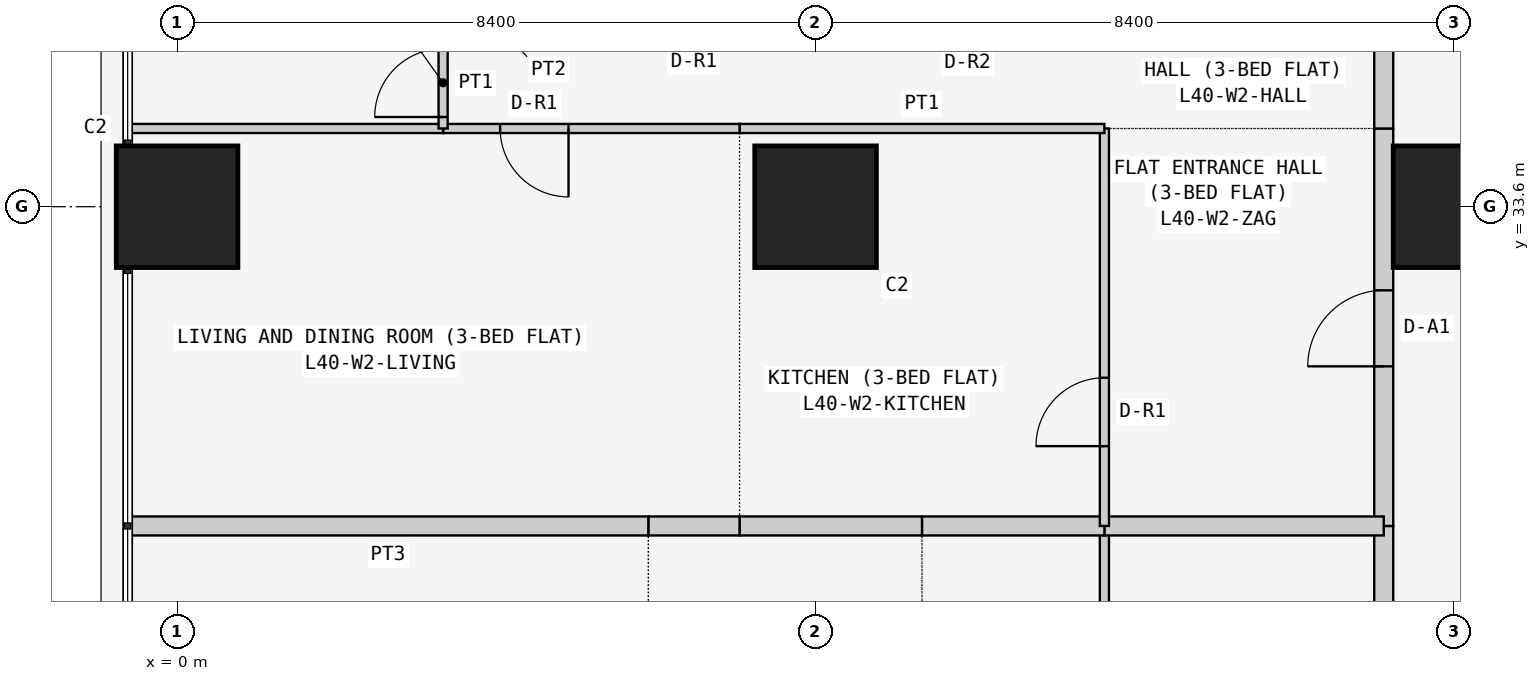
"""IFC4 building model, lengths in metres.
Left out: names, types, materials, properties, quantities, classifications, styles, units other than length and angle.
Written with IfcOpenShell. Run it as: python <this file> out.ifc"""

import sys

from ifc_helpers import new_model, si_unit, direction, frame, frame_2d, origin, origin_2d, place, context, subcontext, project, spatial, rectangle, extrude, element, fill, save


model = new_model("IFC4")
c1 = context("Model", 3, precision=1e-05, world=origin(), true_north=direction((0.0, 1.0)))
c2 = subcontext(c1, "Body", "Model", "MODEL_VIEW")
j1 = project(units=[si_unit("LENGTHUNIT", "METRE"), si_unit("PLANEANGLEUNIT", "RADIAN")], contexts=[c1])
p1 = place(None, origin())
s1 = spatial("IfcSite", under=j1, at=p1, CompositionType="ELEMENT")
p2 = place(p1, origin())
s2 = spatial("IfcBuilding", under=s1, at=p2, CompositionType="ELEMENT")
p3 = place(p2, frame((0.0, 0.0, 155.7)))
s3 = spatial("IfcBuildingStorey", under=s2, at=p3, CompositionType="ELEMENT", Elevation=155.7)
for number, where, z_axis, x_axis in (
    (1, (0.0, 33.6, 0.0), (0.0, 0.0, 1.0), (1.0, 0.0, 0.0)),
    (2, (8.4, 33.6, 0.0), (0.0, 0.0, 1.0), (1.0, 0.0, 0.0)),
    (3, (16.8, 33.6, 0.0), (0.0, 0.0, 1.0), (1.0, 0.0, 0.0)),
):
    element("IfcColumn", number, at=place(p3, frame(where, z_axis=z_axis, x_axis=x_axis)), inside=s3, PredefinedType="COLUMN", context=c2, shape_type="SweptSolid", body=[
        extrude(rectangle(XDim=1.6, YDim=1.6, at=origin_2d()), origin(), (0.0, 0.0, 1.0), 3.6),
    ])
p4 = place(p3, frame((15.875, 24.171, 0.0), z_axis=(0.0, 0.0, 1.0), x_axis=(0.0, 1.0, 0.0)))
e4 = element("IfcWall", 4, at=p4, inside=s3, PredefinedType="PARTITIONING", context=c2, shape_type="SweptSolid", body=[
    extrude(rectangle(XDim=5.229, YDim=0.25, at=frame_2d((2.615, 0.0))), origin(), (0.0, 0.0, 1.0), 3.45),
])
p5 = place(p4, frame((2.129, 0.0, 0.0)))
e5 = element("IfcOpeningElement", 5, at=p5, cuts=e4, PredefinedType="OPENING", context=c2, shape_type="SweptSolid", body=[
    extrude(rectangle(XDim=1.0, YDim=2.1, at=frame_2d((0.5, 1.05))), frame((0.0, 0.135, 0.0), z_axis=(0.0, -1.0, 0.0), x_axis=(1.0, 0.0, 0.0)), (0.0, 0.0, 1.0), 0.27),
])
p6 = place(p3, frame((15.875, 29.4, 0.0), z_axis=(0.0, 0.0, 1.0), x_axis=(0.0, 1.0, 0.0)))
e6 = element("IfcWall", 6, at=p6, inside=s3, PredefinedType="PARTITIONING", context=c2, shape_type="SweptSolid", body=[
    extrude(rectangle(XDim=5.229, YDim=0.25, at=frame_2d((2.615, 0.0))), origin(), (0.0, 0.0, 1.0), 3.45),
])
p7 = place(p6, frame((2.1, 0.0, 0.0)))
e7 = element("IfcOpeningElement", 7, at=p7, cuts=e6, PredefinedType="OPENING", context=c2, shape_type="SweptSolid", body=[
    extrude(rectangle(XDim=1.0, YDim=2.1, at=frame_2d((0.5, 1.05))), frame((0.0, 0.135, 0.0), z_axis=(0.0, -1.0, 0.0), x_axis=(1.0, 0.0, 0.0)), (0.0, 0.0, 1.0), 0.27),
])
p8 = place(p3, frame((15.875, 34.629, 0.0), z_axis=(0.0, 0.0, 1.0), x_axis=(0.0, 1.0, 0.0)))
e8 = element("IfcWall", 8, at=p8, inside=s3, PredefinedType="PARTITIONING", context=c2, shape_type="SweptSolid", body=[
    extrude(rectangle(XDim=1.2, YDim=0.25, at=frame_2d((0.6, 0.0))), origin(), (0.0, 0.0, 1.0), 3.45),
])
p9 = place(p3, frame((12.2, 29.4, 0.0), z_axis=(0.0, 0.0, 1.0), x_axis=(0.0, -1.0, 0.0)))
e9 = element("IfcWall", 9, at=p9, inside=s3, PredefinedType="PARTITIONING", context=c2, shape_type="SweptSolid", body=[
    extrude(rectangle(XDim=5.229, YDim=0.12, at=frame_2d((2.615, 0.0))), origin(), (0.0, 0.0, 1.0), 3.45),
])
p10 = place(p3, frame((15.875, 29.4, 0.0), z_axis=(0.0, 0.0, 1.0), x_axis=(-1.0, 0.0, 0.0)))
e10 = element("IfcWall", 10, at=p10, inside=s3, PredefinedType="PARTITIONING", context=c2, shape_type="SweptSolid", body=[
    extrude(rectangle(XDim=3.675, YDim=0.25, at=frame_2d((1.837, 0.0))), origin(), (0.0, 0.0, 1.0), 3.45),
])
p11 = place(p3, frame((12.2, 29.4, 0.0), z_axis=(0.0, 0.0, 1.0), x_axis=(-1.0, 0.0, 0.0)))
e11 = element("IfcWall", 11, at=p11, inside=s3, PredefinedType="PARTITIONING", context=c2, shape_type="SweptSolid", body=[
    extrude(rectangle(XDim=2.4, YDim=0.25, at=frame_2d((1.2, 0.0))), origin(), (0.0, 0.0, 1.0), 3.45),
])
p12 = place(p3, frame((9.8, 29.4, 0.0), z_axis=(0.0, 0.0, 1.0), x_axis=(-1.0, 0.0, 0.0)))
e12 = element("IfcWall", 12, at=p12, inside=s3, PredefinedType="PARTITIONING", context=c2, shape_type="SweptSolid", body=[
    extrude(rectangle(XDim=2.4, YDim=0.25, at=frame_2d((1.2, 0.0))), origin(), (0.0, 0.0, 1.0), 3.45),
])
p13 = place(p3, frame((7.4, 29.4, 0.0), z_axis=(0.0, 0.0, 1.0), x_axis=(-1.0, 0.0, 0.0)))
e13 = element("IfcWall", 13, at=p13, inside=s3, PredefinedType="PARTITIONING", context=c2, shape_type="SweptSolid", body=[
    extrude(rectangle(XDim=1.2, YDim=0.25, at=frame_2d((0.6, 0.0))), origin(), (0.0, 0.0, 1.0), 3.45),
])
p14 = place(p3, frame((6.2, 29.4, 0.0), z_axis=(0.0, 0.0, 1.0), x_axis=(-1.0, 0.0, 0.0)))
e14 = element("IfcWall", 14, at=p14, inside=s3, PredefinedType="PARTITIONING", context=c2, shape_type="SweptSolid", body=[
    extrude(rectangle(XDim=6.85, YDim=0.25, at=frame_2d((3.425, 0.0))), origin(), (0.0, 0.0, 1.0), 3.45),
])
p15 = place(p3, frame((12.2, 29.4, 0.0), z_axis=(0.0, 0.0, 1.0), x_axis=(0.0, 1.0, 0.0)))
e15 = element("IfcWall", 15, at=p15, inside=s3, PredefinedType="PARTITIONING", context=c2, shape_type="SweptSolid", body=[
    extrude(rectangle(XDim=5.229, YDim=0.12, at=frame_2d((2.615, 0.0))), origin(), (0.0, 0.0, 1.0), 3.45),
])
p16 = place(p15, frame((1.05, 0.0, 0.0)))
e16 = element("IfcOpeningElement", 16, at=p16, cuts=e15, PredefinedType="OPENING", context=c2, shape_type="SweptSolid", body=[
    extrude(rectangle(XDim=0.9, YDim=2.1, at=frame_2d((0.45, 1.05))), frame((0.0, 0.07, 0.0), z_axis=(0.0, -1.0, 0.0), x_axis=(1.0, 0.0, 0.0)), (0.0, 0.0, 1.0), 0.14),
])
p17 = place(p3, frame((7.4, 34.629, 0.0), z_axis=(0.0, 0.0, 1.0), x_axis=(1.0, 0.0, 0.0)))
e17 = element("IfcWall", 17, at=p17, inside=s3, PredefinedType="PARTITIONING", context=c2, shape_type="SweptSolid", body=[
    extrude(rectangle(XDim=4.8, YDim=0.12, at=frame_2d((2.4, 0.0))), origin(), (0.0, 0.0, 1.0), 3.45),
])
p18 = place(p3, frame((3.5, 34.629, 0.0), z_axis=(0.0, 0.0, 1.0), x_axis=(1.0, 0.0, 0.0)))
e18 = element("IfcWall", 18, at=p18, inside=s3, PredefinedType="PARTITIONING", context=c2, shape_type="SweptSolid", body=[
    extrude(rectangle(XDim=3.9, YDim=0.12, at=frame_2d((1.95, 0.0))), origin(), (0.0, 0.0, 1.0), 3.45),
])
p19 = place(p18, frame((0.75, 0.0, 0.0)))
e19 = element("IfcOpeningElement", 19, at=p19, cuts=e18, PredefinedType="OPENING", context=c2, shape_type="SweptSolid", body=[
    extrude(rectangle(XDim=0.9, YDim=2.1, at=frame_2d((0.45, 1.05))), frame((0.0, 0.07, 0.0), z_axis=(0.0, -1.0, 0.0), x_axis=(1.0, 0.0, 0.0)), (0.0, 0.0, 1.0), 0.14),
])
p20 = place(p3, frame((-0.65, 34.629, 0.0), z_axis=(0.0, 0.0, 1.0), x_axis=(1.0, 0.0, 0.0)))
e20 = element("IfcWall", 20, at=p20, inside=s3, PredefinedType="PARTITIONING", context=c2, shape_type="SweptSolid", body=[
    extrude(rectangle(XDim=4.15, YDim=0.12, at=frame_2d((2.075, 0.0))), origin(), (0.0, 0.0, 1.0), 3.45),
])
p21 = place(p3, frame((3.5, 34.629, 0.0), z_axis=(0.0, 0.0, 1.0), x_axis=(0.0, 1.0, 0.0)))
e21 = element("IfcWall", 21, at=p21, inside=s3, PredefinedType="PARTITIONING", context=c2, shape_type="SweptSolid", body=[
    extrude(rectangle(XDim=1.2, YDim=0.12, at=frame_2d((0.6, 0.0))), origin(), (0.0, 0.0, 1.0), 3.45),
])
p22 = place(p21, frame((0.151, 0.0, 0.0)))
e22 = element("IfcOpeningElement", 22, at=p22, cuts=e21, PredefinedType="OPENING", context=c2, shape_type="SweptSolid", body=[
    extrude(rectangle(XDim=0.9, YDim=2.1, at=frame_2d((0.45, 1.05))), frame((0.0, 0.07, 0.0), z_axis=(0.0, -1.0, 0.0), x_axis=(1.0, 0.0, 0.0)), (0.0, 0.0, 1.0), 0.14),
])
p23 = place(p7, origin())
e23 = element("IfcDoor", 23, at=p23, inside=s3, OperationType="SINGLE_SWING_LEFT", PredefinedType="DOOR", context=c2, shape_type="SweptSolid", body=[
    extrude(rectangle(XDim=1.0, YDim=2.1, at=frame_2d((0.5, 1.05))), frame((0.0, 0.025, 0.0), z_axis=(0.0, -1.0, 0.0), x_axis=(1.0, 0.0, 0.0)), (0.0, 0.0, 1.0), 0.05),
])
fill(e7, e23)
p24 = place(p16, origin())
e24 = element("IfcDoor", 24, at=p24, inside=s3, OperationType="SINGLE_SWING_LEFT", PredefinedType="DOOR", context=c2, shape_type="SweptSolid", body=[
    extrude(rectangle(XDim=0.9, YDim=2.1, at=frame_2d((0.45, 1.05))), frame((0.0, 0.025, 0.0), z_axis=(0.0, -1.0, 0.0), x_axis=(1.0, 0.0, 0.0)), (0.0, 0.0, 1.0), 0.05),
])
fill(e16, e24)
p25 = place(p19, frame((0.9, 0.0, 0.0), z_axis=(0.0, 0.0, 1.0), x_axis=(-1.0, 0.0, 0.0)))
e25 = element("IfcDoor", 25, at=p25, inside=s3, OperationType="SINGLE_SWING_LEFT", PredefinedType="DOOR", context=c2, shape_type="SweptSolid", body=[
    extrude(rectangle(XDim=0.9, YDim=2.1, at=frame_2d((0.45, 1.05))), frame((0.0, 0.025, 0.0), z_axis=(0.0, -1.0, 0.0), x_axis=(1.0, 0.0, 0.0)), (0.0, 0.0, 1.0), 0.05),
])
fill(e19, e25)
p26 = place(p22, origin())
e26 = element("IfcDoor", 26, at=p26, inside=s3, OperationType="SINGLE_SWING_LEFT", PredefinedType="DOOR", context=c2, shape_type="SweptSolid", body=[
    extrude(rectangle(XDim=0.9, YDim=2.1, at=frame_2d((0.45, 1.05))), frame((0.0, 0.025, 0.0), z_axis=(0.0, -1.0, 0.0), x_axis=(1.0, 0.0, 0.0)), (0.0, 0.0, 1.0), 0.05),
])
fill(e22, e26)
save(model, sys.argv[1])
